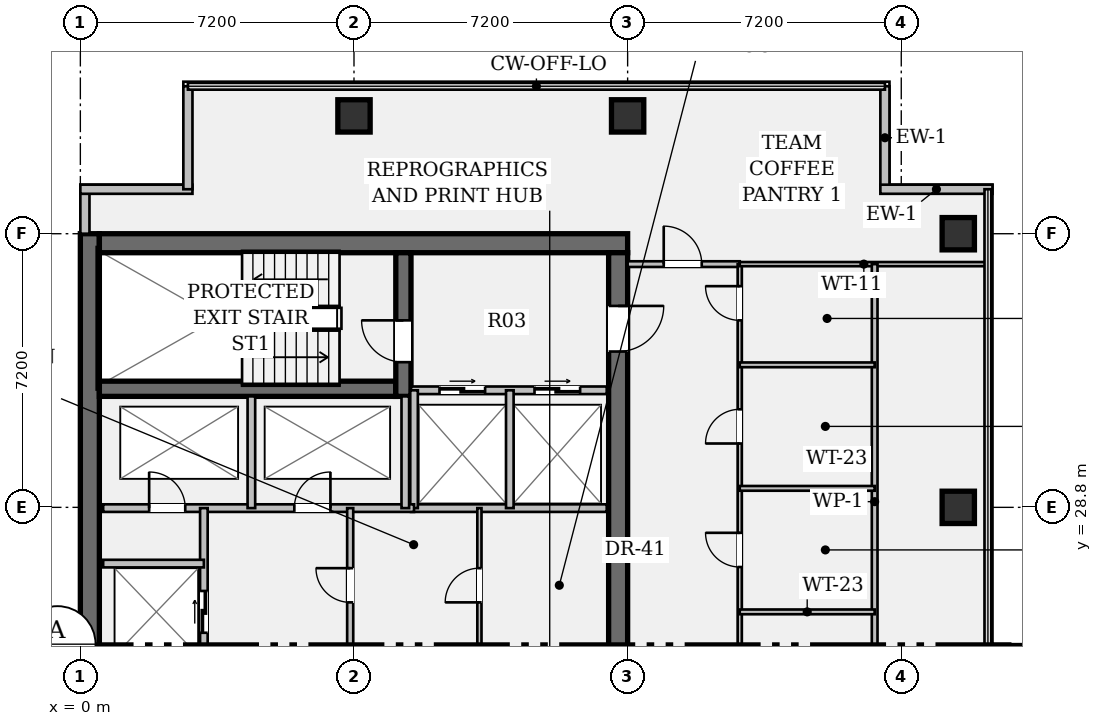
"""IFC4 building model, lengths in metres.
Left out: names, types, materials, properties, quantities, classifications, styles, units other than length and angle.
Written with IfcOpenShell. Run it as: python <this file> out.ifc"""

import sys

from ifc_helpers import new_model, si_unit, direction, frame, frame_2d, origin, origin_2d, place, context, subcontext, project, spatial, rectangle, hollow_rectangle, extrude, element, fill, save


model = new_model("IFC4")
c1 = context("Model", 3, precision=1e-05, world=origin(), true_north=direction((0.0, 1.0)))
c2 = subcontext(c1, "Body", "Model", "MODEL_VIEW")
j1 = project(units=[si_unit("LENGTHUNIT", "METRE"), si_unit("PLANEANGLEUNIT", "RADIAN")], contexts=[c1])
p1 = place(None, origin())
s1 = spatial("IfcSite", under=j1, at=p1, CompositionType="ELEMENT")
p2 = place(p1, origin())
s2 = spatial("IfcBuilding", under=s1, at=p2, CompositionType="ELEMENT")
p3 = place(p2, frame((0.0, 0.0, 173.25)))
s3 = spatial("IfcBuildingStorey", under=s2, at=p3, CompositionType="ELEMENT", Elevation=173.25)
p4 = place(p3, frame((0.25, 7.2, 0.0), z_axis=(0.0, 0.0, 1.0), x_axis=(0.0, 1.0, 0.0)))
e1 = element("IfcWall", 1, at=p4, inside=s3, PredefinedType="SHEAR", context=c2, shape_type="SweptSolid", body=[
    extrude(rectangle(XDim=28.8, YDim=0.5, at=frame_2d((14.4, 0.0))), origin(), (0.0, 0.0, 1.0), 3.24),
])
p5 = place(p3, frame((0.5, 35.75, 0.0), z_axis=(0.0, 0.0, 1.0), x_axis=(1.0, 0.0, 0.0)))
e2 = element("IfcWall", 2, at=p5, inside=s3, PredefinedType="SHEAR", context=c2, shape_type="SweptSolid", body=[
    extrude(rectangle(XDim=13.9, YDim=0.5, at=frame_2d((6.95, 0.0))), origin(), (0.0, 0.0, 1.0), 3.24),
])
p6 = place(p3, frame((14.15, 35.5, 0.0), z_axis=(0.0, 0.0, 1.0), x_axis=(0.0, -1.0, 0.0)))
e3 = element("IfcWall", 3, at=p6, inside=s3, PredefinedType="SHEAR", context=c2, shape_type="SweptSolid", body=[
    extrude(rectangle(XDim=27.8, YDim=0.5, at=frame_2d((13.9, 0.0))), origin(), (0.0, 0.0, 1.0), 3.24),
])
p7 = place(p6, frame((1.4, 0.0, 0.0)))
e4 = element("IfcOpeningElement", 4, at=p7, cuts=e3, PredefinedType="OPENING", context=c2, shape_type="SweptSolid", body=[
    extrude(rectangle(XDim=1.2, YDim=2.15, at=frame_2d((0.6, 1.075))), frame((0.0, 0.262, 0.0), z_axis=(0.0, -1.0, 0.0), x_axis=(1.0, 0.0, 0.0)), (0.0, 0.0, 1.0), 0.524),
])
p8 = place(p6, frame((25.35, 0.0, 0.0)))
e5 = element("IfcOpeningElement", 5, at=p8, cuts=e3, PredefinedType="OPENING", context=c2, shape_type="SweptSolid", body=[
    extrude(rectangle(XDim=1.2, YDim=2.15, at=frame_2d((0.6, 1.075))), frame((0.0, 0.262, 0.0), z_axis=(0.0, -1.0, 0.0), x_axis=(1.0, 0.0, 0.0)), (0.0, 0.0, 1.0), 0.524),
])
p9 = place(p6, frame((14.7, 0.0, 0.0)))
e6 = element("IfcOpeningElement", 6, at=p9, cuts=e3, PredefinedType="OPENING", context=c2, shape_type="SweptSolid", body=[
    extrude(rectangle(XDim=1.6, YDim=2.2, at=frame_2d((0.8, 1.1))), frame((0.0, 0.262, 0.0), z_axis=(0.0, -1.0, 0.0), x_axis=(1.0, 0.0, 0.0)), (0.0, 0.0, 1.0), 0.524),
])
p10 = place(p3, frame((0.5, 31.92, 0.0), z_axis=(0.0, 0.0, 1.0), x_axis=(1.0, 0.0, 0.0)))
e7 = element("IfcWall", 7, at=p10, inside=s3, PredefinedType="SHEAR", context=c2, shape_type="SweptSolid", body=[
    extrude(rectangle(XDim=7.8, YDim=0.4, at=frame_2d((3.9, 0.0))), origin(), (0.0, 0.0, 1.0), 3.24),
])
p11 = place(p3, frame((8.5, 31.72, 0.0), z_axis=(0.0, 0.0, 1.0), x_axis=(0.0, 1.0, 0.0)))
e8 = element("IfcWall", 8, at=p11, inside=s3, PredefinedType="SHEAR", context=c2, shape_type="SweptSolid", body=[
    extrude(rectangle(XDim=3.78, YDim=0.4, at=frame_2d((1.89, 0.0))), origin(), (0.0, 0.0, 1.0), 3.24),
])
p12 = place(p11, frame((0.9, 0.0, 0.0)))
e9 = element("IfcOpeningElement", 9, at=p12, cuts=e8, PredefinedType="OPENING", context=c2, shape_type="SweptSolid", body=[
    extrude(rectangle(XDim=1.1, YDim=2.15, at=frame_2d((0.55, 1.075))), frame((0.0, 0.212, 0.0), z_axis=(0.0, -1.0, 0.0), x_axis=(1.0, 0.0, 0.0)), (0.0, 0.0, 1.0), 0.424),
])
for number, where, z_axis, x_axis in (
    (10, (7.2, 39.1, 0.0), (0.0, 0.0, 1.0), (1.0, 0.0, 0.0)),
    (11, (14.4, 39.1, 0.0), (0.0, 0.0, 1.0), (1.0, 0.0, 0.0)),
    (12, (23.1, 28.8, 0.0), (0.0, 0.0, 1.0), (1.0, 0.0, 0.0)),
    (13, (23.1, 36.0, 0.0), (0.0, 0.0, 1.0), (1.0, 0.0, 0.0)),
):
    element("IfcColumn", number, at=place(p3, frame(where, z_axis=z_axis, x_axis=x_axis)), inside=s3, PredefinedType="COLUMN", context=c2, shape_type="SweptSolid", body=[
        extrude(hollow_rectangle(XDim=0.85, YDim=0.85, WallThickness=0.05, at=origin_2d()), origin(), (0.0, 0.0, 1.0), 3.24),
    ])
p13 = place(p3, frame((0.12, 36.0, 0.0), z_axis=(0.0, 0.0, 1.0), x_axis=(0.0, 1.0, 0.0)))
e14 = element("IfcWall", 14, at=p13, inside=s3, PredefinedType="STANDARD", context=c2, shape_type="SweptSolid", body=[
    extrude(rectangle(XDim=1.17, YDim=0.24, at=frame_2d((0.585, 0.0))), origin(), (0.0, 0.0, 1.0), 3.24),
])
p14 = place(p3, frame((0.0, 37.17, 0.0), z_axis=(0.0, 0.0, 1.0), x_axis=(1.0, 0.0, 0.0)))
e15 = element("IfcWall", 15, at=p14, inside=s3, PredefinedType="STANDARD", context=c2, shape_type="SweptSolid", body=[
    extrude(rectangle(XDim=2.95, YDim=0.24, at=frame_2d((1.475, 0.0))), origin(), (0.0, 0.0, 1.0), 3.24),
])
for number, where, z_axis, x_axis in (
    (16, (2.83, 37.17, 0.0), (0.0, 0.0, 1.0), (0.0, 1.0, 0.0)),
    (17, (21.17, 39.88, 0.0), (0.0, 0.0, 1.0), (0.0, -1.0, 0.0)),
):
    element("IfcWall", number, at=place(p3, frame(where, z_axis=z_axis, x_axis=x_axis)), inside=s3, PredefinedType="STANDARD", context=c2, shape_type="SweptSolid", body=[
        extrude(rectangle(XDim=2.71, YDim=0.24, at=frame_2d((1.355, 0.0))), origin(), (0.0, 0.0, 1.0), 3.24),
    ])
p15 = place(p3, frame((21.05, 37.17, 0.0), z_axis=(0.0, 0.0, 1.0), x_axis=(1.0, 0.0, 0.0)))
e18 = element("IfcWall", 18, at=p15, inside=s3, PredefinedType="STANDARD", context=c2, shape_type="SweptSolid", body=[
    extrude(rectangle(XDim=2.95, YDim=0.24, at=frame_2d((1.475, 0.0))), origin(), (0.0, 0.0, 1.0), 3.24),
])
p16 = place(p3, frame((8.7, 31.88, 0.0), z_axis=(0.0, 0.0, 1.0), x_axis=(1.0, 0.0, 0.0)))
e19 = element("IfcWall", 19, at=p16, inside=s3, PredefinedType="PARTITIONING", context=c2, shape_type="SweptSolid", body=[
    extrude(rectangle(XDim=5.15, YDim=0.2, at=frame_2d((2.575, 0.0))), origin(), (0.0, 0.0, 1.0), 3.24),
])
p17 = place(p16, frame((0.75, 0.0, 0.0)))
e20 = element("IfcOpeningElement", 20, at=p17, cuts=e19, PredefinedType="OPENING", context=c2, shape_type="SweptSolid", body=[
    extrude(rectangle(XDim=1.2, YDim=2.2, at=frame_2d((0.6, 1.1))), frame((0.0, 0.112, 0.0), z_axis=(0.0, -1.0, 0.0), x_axis=(1.0, 0.0, 0.0)), (0.0, 0.0, 1.0), 0.224),
])
p18 = place(p16, frame((3.25, 0.0, 0.0)))
e21 = element("IfcOpeningElement", 21, at=p18, cuts=e19, PredefinedType="OPENING", context=c2, shape_type="SweptSolid", body=[
    extrude(rectangle(XDim=1.2, YDim=2.2, at=frame_2d((0.6, 1.1))), frame((0.0, 0.112, 0.0), z_axis=(0.0, -1.0, 0.0), x_axis=(1.0, 0.0, 0.0)), (0.0, 0.0, 1.0), 0.224),
])
p19 = place(p3, frame((8.7, 28.78, 0.0), z_axis=(0.0, 0.0, 1.0), x_axis=(1.0, 0.0, 0.0)))
e22 = element("IfcWall", 22, at=p19, inside=s3, PredefinedType="PARTITIONING", context=c2, shape_type="SweptSolid", body=[
    extrude(rectangle(XDim=5.15, YDim=0.2, at=frame_2d((2.575, 0.0))), origin(), (0.0, 0.0, 1.0), 3.24),
])
for number, where, z_axis, x_axis in (
    (23, (8.78, 28.78, 0.0), (0.0, 0.0, 1.0), (0.0, 1.0, 0.0)),
    (24, (11.3, 28.78, 0.0), (0.0, 0.0, 1.0), (0.0, 1.0, 0.0)),
):
    element("IfcWall", number, at=place(p3, frame(where, z_axis=z_axis, x_axis=x_axis)), inside=s3, PredefinedType="PARTITIONING", context=c2, shape_type="SweptSolid", body=[
        extrude(rectangle(XDim=3.1, YDim=0.2, at=frame_2d((1.55, 0.0))), origin(), (0.0, 0.0, 1.0), 3.24),
    ])
p20 = place(p3, frame((0.6, 28.78, 0.0), z_axis=(0.0, 0.0, 1.0), x_axis=(1.0, 0.0, 0.0)))
e25 = element("IfcWall", 25, at=p20, inside=s3, PredefinedType="PARTITIONING", context=c2, shape_type="SweptSolid", body=[
    extrude(rectangle(XDim=8.18, YDim=0.2, at=frame_2d((4.09, 0.0))), origin(), (0.0, 0.0, 1.0), 3.24),
])
p21 = place(p20, frame((1.21, 0.0, 0.0)))
e26 = element("IfcOpeningElement", 26, at=p21, cuts=e25, PredefinedType="OPENING", context=c2, shape_type="SweptSolid", body=[
    extrude(rectangle(XDim=0.95, YDim=2.15, at=frame_2d((0.475, 1.075))), frame((0.0, 0.112, 0.0), z_axis=(0.0, -1.0, 0.0), x_axis=(1.0, 0.0, 0.0)), (0.0, 0.0, 1.0), 0.224),
])
p22 = place(p20, frame((5.03, 0.0, 0.0)))
e27 = element("IfcOpeningElement", 27, at=p22, cuts=e25, PredefinedType="OPENING", context=c2, shape_type="SweptSolid", body=[
    extrude(rectangle(XDim=0.95, YDim=2.15, at=frame_2d((0.475, 1.075))), frame((0.0, 0.112, 0.0), z_axis=(0.0, -1.0, 0.0), x_axis=(1.0, 0.0, 0.0)), (0.0, 0.0, 1.0), 0.224),
])
for number, where, z_axis, x_axis in (
    (28, (4.5, 28.78, 0.0), (0.0, 0.0, 1.0), (0.0, 1.0, 0.0)),
    (29, (8.55, 28.78, 0.0), (0.0, 0.0, 1.0), (0.0, 1.0, 0.0)),
):
    element("IfcWall", number, at=place(p3, frame(where, z_axis=z_axis, x_axis=x_axis)), inside=s3, PredefinedType="PARTITIONING", context=c2, shape_type="SweptSolid", body=[
        extrude(rectangle(XDim=2.94, YDim=0.2, at=frame_2d((1.47, 0.0))), origin(), (0.0, 0.0, 1.0), 3.24),
    ])
p23 = place(p3, frame((3.25, 15.7, 0.0), z_axis=(0.0, 0.0, 1.0), x_axis=(0.0, 1.0, 0.0)))
e30 = element("IfcWall", 30, at=p23, inside=s3, PredefinedType="PARTITIONING", context=c2, shape_type="SweptSolid", body=[
    extrude(rectangle(XDim=13.08, YDim=0.2, at=frame_2d((6.54, 0.0))), origin(), (0.0, 0.0, 1.0), 3.24),
])
p24 = place(p23, frame((0.9, 0.0, 0.0)))
e31 = element("IfcOpeningElement", 31, at=p24, cuts=e30, PredefinedType="OPENING", context=c2, shape_type="SweptSolid", body=[
    extrude(rectangle(XDim=1.1, YDim=2.2, at=frame_2d((0.55, 1.1))), frame((0.0, 0.112, 0.0), z_axis=(0.0, -1.0, 0.0), x_axis=(1.0, 0.0, 0.0)), (0.0, 0.0, 1.0), 0.224),
])
p25 = place(p23, frame((3.5, 0.0, 0.0)))
e32 = element("IfcOpeningElement", 32, at=p25, cuts=e30, PredefinedType="OPENING", context=c2, shape_type="SweptSolid", body=[
    extrude(rectangle(XDim=1.1, YDim=2.2, at=frame_2d((0.55, 1.1))), frame((0.0, 0.112, 0.0), z_axis=(0.0, -1.0, 0.0), x_axis=(1.0, 0.0, 0.0)), (0.0, 0.0, 1.0), 0.224),
])
p26 = place(p23, frame((7.2, 0.0, 0.0)))
e33 = element("IfcOpeningElement", 33, at=p26, cuts=e30, PredefinedType="OPENING", context=c2, shape_type="SweptSolid", body=[
    extrude(rectangle(XDim=1.1, YDim=2.2, at=frame_2d((0.55, 1.1))), frame((0.0, 0.112, 0.0), z_axis=(0.0, -1.0, 0.0), x_axis=(1.0, 0.0, 0.0)), (0.0, 0.0, 1.0), 0.224),
])
p27 = place(p23, frame((9.8, 0.0, 0.0)))
e34 = element("IfcOpeningElement", 34, at=p27, cuts=e30, PredefinedType="OPENING", context=c2, shape_type="SweptSolid", body=[
    extrude(rectangle(XDim=1.1, YDim=2.2, at=frame_2d((0.55, 1.1))), frame((0.0, 0.112, 0.0), z_axis=(0.0, -1.0, 0.0), x_axis=(1.0, 0.0, 0.0)), (0.0, 0.0, 1.0), 0.224),
])
p28 = place(p3, frame((0.6, 27.32, 0.0), z_axis=(0.0, 0.0, 1.0), x_axis=(1.0, 0.0, 0.0)))
e35 = element("IfcWall", 35, at=p28, inside=s3, PredefinedType="PARTITIONING", context=c2, shape_type="SweptSolid", body=[
    extrude(rectangle(XDim=2.65, YDim=0.2, at=frame_2d((1.325, 0.0))), origin(), (0.0, 0.0, 1.0), 3.24),
])
p29 = place(p3, frame((7.1, 22.2, 0.0), z_axis=(0.0, 0.0, 1.0), x_axis=(0.0, 1.0, 0.0)))
e36 = element("IfcWall", 36, at=p29, inside=s3, PredefinedType="PARTITIONING", context=c2, shape_type="SweptSolid", body=[
    extrude(rectangle(XDim=6.58, YDim=0.16, at=frame_2d((3.29, 0.0))), origin(), (0.0, 0.0, 1.0), 3.24),
])
p30 = place(p29, frame((4.1, 0.0, 0.0)))
e37 = element("IfcOpeningElement", 37, at=p30, cuts=e36, PredefinedType="OPENING", context=c2, shape_type="SweptSolid", body=[
    extrude(rectangle(XDim=0.9, YDim=2.15, at=frame_2d((0.45, 1.075))), frame((0.0, 0.092, 0.0), z_axis=(0.0, -1.0, 0.0), x_axis=(1.0, 0.0, 0.0)), (0.0, 0.0, 1.0), 0.184),
])
p31 = place(p3, frame((10.5, 25.0, 0.0), z_axis=(0.0, 0.0, 1.0), x_axis=(0.0, 1.0, 0.0)))
e38 = element("IfcWall", 38, at=p31, inside=s3, PredefinedType="PARTITIONING", context=c2, shape_type="SweptSolid", body=[
    extrude(rectangle(XDim=3.78, YDim=0.11, at=frame_2d((1.89, 0.0))), origin(), (0.0, 0.0, 1.0), 3.24),
])
p32 = place(p31, frame((1.3, 0.0, 0.0)))
e39 = element("IfcOpeningElement", 39, at=p32, cuts=e38, PredefinedType="OPENING", context=c2, shape_type="SweptSolid", body=[
    extrude(rectangle(XDim=0.9, YDim=2.15, at=frame_2d((0.45, 1.075))), frame((0.0, 0.067, 0.0), z_axis=(0.0, -1.0, 0.0), x_axis=(1.0, 0.0, 0.0)), (0.0, 0.0, 1.0), 0.134),
])
p33 = place(p3, frame((14.4, 35.2, 0.0), z_axis=(0.0, 0.0, 1.0), x_axis=(1.0, 0.0, 0.0)))
e40 = element("IfcWall", 40, at=p33, inside=s3, PredefinedType="PARTITIONING", context=c2, shape_type="SweptSolid", body=[
    extrude(rectangle(XDim=2.95, YDim=0.15, at=frame_2d((1.475, 0.0))), origin(), (0.0, 0.0, 1.0), 2.808),
])
p34 = place(p33, frame((0.95, 0.0, 0.0)))
e41 = element("IfcOpeningElement", 41, at=p34, cuts=e40, PredefinedType="OPENING", context=c2, shape_type="SweptSolid", body=[
    extrude(rectangle(XDim=1.0, YDim=2.15, at=frame_2d((0.5, 1.075))), frame((0.0, 0.087, 0.0), z_axis=(0.0, -1.0, 0.0), x_axis=(1.0, 0.0, 0.0)), (0.0, 0.0, 1.0), 0.174),
])
p35 = place(p3, frame((17.35, 12.55, 0.0), z_axis=(0.0, 0.0, 1.0), x_axis=(0.0, 1.0, 0.0)))
e42 = element("IfcWall", 42, at=p35, inside=s3, PredefinedType="PARTITIONING", context=c2, shape_type="SweptSolid", body=[
    extrude(rectangle(XDim=22.65, YDim=0.11, at=frame_2d((11.325, 0.0))), origin(), (0.0, 0.0, 1.0), 2.603),
])
p36 = place(p35, frame((11.43, 0.0, 0.0)))
e43 = element("IfcOpeningElement", 43, at=p36, cuts=e42, PredefinedType="OPENING", context=c2, shape_type="SweptSolid", body=[
    extrude(rectangle(XDim=0.9, YDim=2.15, at=frame_2d((0.45, 1.075))), frame((0.0, 0.067, 0.0), z_axis=(0.0, -1.0, 0.0), x_axis=(1.0, 0.0, 0.0)), (0.0, 0.0, 1.0), 0.134),
])
p37 = place(p35, frame((14.68, 0.0, 0.0)))
e44 = element("IfcOpeningElement", 44, at=p37, cuts=e42, PredefinedType="OPENING", context=c2, shape_type="SweptSolid", body=[
    extrude(rectangle(XDim=0.9, YDim=2.15, at=frame_2d((0.45, 1.075))), frame((0.0, 0.067, 0.0), z_axis=(0.0, -1.0, 0.0), x_axis=(1.0, 0.0, 0.0)), (0.0, 0.0, 1.0), 0.134),
])
p38 = place(p35, frame((17.93, 0.0, 0.0)))
e45 = element("IfcOpeningElement", 45, at=p38, cuts=e42, PredefinedType="OPENING", context=c2, shape_type="SweptSolid", body=[
    extrude(rectangle(XDim=0.9, YDim=2.15, at=frame_2d((0.45, 1.075))), frame((0.0, 0.067, 0.0), z_axis=(0.0, -1.0, 0.0), x_axis=(1.0, 0.0, 0.0)), (0.0, 0.0, 1.0), 0.134),
])
p39 = place(p35, frame((21.17, 0.0, 0.0)))
e46 = element("IfcOpeningElement", 46, at=p39, cuts=e42, PredefinedType="OPENING", context=c2, shape_type="SweptSolid", body=[
    extrude(rectangle(XDim=0.9, YDim=2.15, at=frame_2d((0.45, 1.075))), frame((0.0, 0.067, 0.0), z_axis=(0.0, -1.0, 0.0), x_axis=(1.0, 0.0, 0.0)), (0.0, 0.0, 1.0), 0.134),
])
p40 = place(p3, frame((17.35, 35.2, 0.0), z_axis=(0.0, 0.0, 1.0), x_axis=(1.0, 0.0, 0.0)))
e47 = element("IfcWall", 47, at=p40, inside=s3, PredefinedType="PARTITIONING", context=c2, shape_type="SweptSolid", body=[
    extrude(rectangle(XDim=6.53, YDim=0.11, at=frame_2d((3.265, 0.0))), origin(), (0.0, 0.0, 1.0), 2.758),
])
p41 = place(p3, frame((20.9, 22.7, 0.0), z_axis=(0.0, 0.0, 1.0), x_axis=(0.0, 1.0, 0.0)))
e48 = element("IfcWall", 48, at=p41, inside=s3, PredefinedType="PARTITIONING", context=c2, shape_type="SweptSolid", body=[
    extrude(rectangle(XDim=12.5, YDim=0.15, at=frame_2d((6.25, 0.0))), origin(), (0.0, 0.0, 1.0), 2.603),
])
for number, where, z_axis, x_axis in (
    (49, (17.35, 26.05, 0.0), (0.0, 0.0, 1.0), (1.0, 0.0, 0.0)),
    (50, (17.35, 29.3, 0.0), (0.0, 0.0, 1.0), (1.0, 0.0, 0.0)),
    (51, (17.35, 32.55, 0.0), (0.0, 0.0, 1.0), (1.0, 0.0, 0.0)),
):
    element("IfcWall", number, at=place(p3, frame(where, z_axis=z_axis, x_axis=x_axis)), inside=s3, PredefinedType="PARTITIONING", context=c2, shape_type="SweptSolid", body=[
        extrude(rectangle(XDim=3.55, YDim=0.125, at=frame_2d((1.775, 0.0))), origin(), (0.0, 0.0, 1.0), 2.808),
    ])
p42 = place(p12, origin())
e52 = element("IfcDoor", 52, at=p42, inside=s3, OperationType="SINGLE_SWING_RIGHT", PredefinedType="DOOR", context=c2, shape_type="SweptSolid", body=[
    extrude(rectangle(XDim=1.1, YDim=2.15, at=frame_2d((0.55, 1.075))), frame((0.0, 0.025, 0.0), z_axis=(0.0, -1.0, 0.0), x_axis=(1.0, 0.0, 0.0)), (0.0, 0.0, 1.0), 0.05),
])
fill(e9, e52)
p43 = place(p7, origin())
e53 = element("IfcDoor", 53, at=p43, inside=s3, OperationType="SINGLE_SWING_LEFT", PredefinedType="DOOR", context=c2, shape_type="SweptSolid", body=[
    extrude(rectangle(XDim=1.2, YDim=2.15, at=frame_2d((0.6, 1.075))), frame((0.0, 0.025, 0.0), z_axis=(0.0, -1.0, 0.0), x_axis=(1.0, 0.0, 0.0)), (0.0, 0.0, 1.0), 0.05),
])
fill(e4, e53)
p44 = place(p17, origin())
e54 = element("IfcDoor", 54, at=p44, inside=s3, OperationType="DOUBLE_DOOR_SLIDING", PredefinedType="DOOR", context=c2, shape_type="SweptSolid", body=[
    extrude(rectangle(XDim=1.2, YDim=2.2, at=frame_2d((0.6, 1.1))), frame((0.0, 0.025, 0.0), z_axis=(0.0, -1.0, 0.0), x_axis=(1.0, 0.0, 0.0)), (0.0, 0.0, 1.0), 0.05),
])
fill(e20, e54)
p45 = place(p18, origin())
e55 = element("IfcDoor", 55, at=p45, inside=s3, OperationType="DOUBLE_DOOR_SLIDING", PredefinedType="DOOR", context=c2, shape_type="SweptSolid", body=[
    extrude(rectangle(XDim=1.2, YDim=2.2, at=frame_2d((0.6, 1.1))), frame((0.0, 0.025, 0.0), z_axis=(0.0, -1.0, 0.0), x_axis=(1.0, 0.0, 0.0)), (0.0, 0.0, 1.0), 0.05),
])
fill(e21, e55)
p46 = place(p21, origin())
e56 = element("IfcDoor", 56, at=p46, inside=s3, OperationType="SINGLE_SWING_LEFT", PredefinedType="DOOR", context=c2, shape_type="SweptSolid", body=[
    extrude(rectangle(XDim=0.95, YDim=2.15, at=frame_2d((0.475, 1.075))), frame((0.0, 0.025, 0.0), z_axis=(0.0, -1.0, 0.0), x_axis=(1.0, 0.0, 0.0)), (0.0, 0.0, 1.0), 0.05),
])
fill(e26, e56)
p47 = place(p22, origin())
e57 = element("IfcDoor", 57, at=p47, inside=s3, OperationType="SINGLE_SWING_RIGHT", PredefinedType="DOOR", context=c2, shape_type="SweptSolid", body=[
    extrude(rectangle(XDim=0.95, YDim=2.15, at=frame_2d((0.475, 1.075))), frame((0.0, 0.025, 0.0), z_axis=(0.0, -1.0, 0.0), x_axis=(1.0, 0.0, 0.0)), (0.0, 0.0, 1.0), 0.05),
])
fill(e27, e57)
p48 = place(p27, origin())
e58 = element("IfcDoor", 58, at=p48, inside=s3, OperationType="DOUBLE_DOOR_SLIDING", PredefinedType="DOOR", context=c2, shape_type="SweptSolid", body=[
    extrude(rectangle(XDim=1.1, YDim=2.2, at=frame_2d((0.55, 1.1))), frame((0.0, 0.025, 0.0), z_axis=(0.0, -1.0, 0.0), x_axis=(1.0, 0.0, 0.0)), (0.0, 0.0, 1.0), 0.05),
])
fill(e34, e58)
p49 = place(p30, origin())
e59 = element("IfcDoor", 59, at=p49, inside=s3, OperationType="SINGLE_SWING_RIGHT", PredefinedType="DOOR", context=c2, shape_type="SweptSolid", body=[
    extrude(rectangle(XDim=0.9, YDim=2.15, at=frame_2d((0.45, 1.075))), frame((0.0, 0.025, 0.0), z_axis=(0.0, -1.0, 0.0), x_axis=(1.0, 0.0, 0.0)), (0.0, 0.0, 1.0), 0.05),
])
fill(e37, e59)
p50 = place(p32, origin())
e60 = element("IfcDoor", 60, at=p50, inside=s3, OperationType="SINGLE_SWING_LEFT", PredefinedType="DOOR", context=c2, shape_type="SweptSolid", body=[
    extrude(rectangle(XDim=0.9, YDim=2.15, at=frame_2d((0.45, 1.075))), frame((0.0, 0.025, 0.0), z_axis=(0.0, -1.0, 0.0), x_axis=(1.0, 0.0, 0.0)), (0.0, 0.0, 1.0), 0.05),
])
fill(e39, e60)
p51 = place(p34, origin())
e61 = element("IfcDoor", 61, at=p51, inside=s3, OperationType="SINGLE_SWING_LEFT", PredefinedType="DOOR", context=c2, shape_type="SweptSolid", body=[
    extrude(rectangle(XDim=1.0, YDim=2.15, at=frame_2d((0.5, 1.075))), frame((0.0, 0.025, 0.0), z_axis=(0.0, -1.0, 0.0), x_axis=(1.0, 0.0, 0.0)), (0.0, 0.0, 1.0), 0.05),
])
fill(e41, e61)
p52 = place(p37, origin())
e62 = element("IfcDoor", 62, at=p52, inside=s3, OperationType="SINGLE_SWING_RIGHT", PredefinedType="DOOR", context=c2, shape_type="SweptSolid", body=[
    extrude(rectangle(XDim=0.9, YDim=2.15, at=frame_2d((0.45, 1.075))), frame((0.0, 0.025, 0.0), z_axis=(0.0, -1.0, 0.0), x_axis=(1.0, 0.0, 0.0)), (0.0, 0.0, 1.0), 0.05),
])
fill(e44, e62)
p53 = place(p38, origin())
e63 = element("IfcDoor", 63, at=p53, inside=s3, OperationType="SINGLE_SWING_LEFT", PredefinedType="DOOR", context=c2, shape_type="SweptSolid", body=[
    extrude(rectangle(XDim=0.9, YDim=2.15, at=frame_2d((0.45, 1.075))), frame((0.0, 0.025, 0.0), z_axis=(0.0, -1.0, 0.0), x_axis=(1.0, 0.0, 0.0)), (0.0, 0.0, 1.0), 0.05),
])
fill(e45, e63)
p54 = place(p39, origin())
e64 = element("IfcDoor", 64, at=p54, inside=s3, OperationType="SINGLE_SWING_RIGHT", PredefinedType="DOOR", context=c2, shape_type="SweptSolid", body=[
    extrude(rectangle(XDim=0.9, YDim=2.15, at=frame_2d((0.45, 1.075))), frame((0.0, 0.025, 0.0), z_axis=(0.0, -1.0, 0.0), x_axis=(1.0, 0.0, 0.0)), (0.0, 0.0, 1.0), 0.05),
])
fill(e46, e64)
save(model, sys.argv[1])
